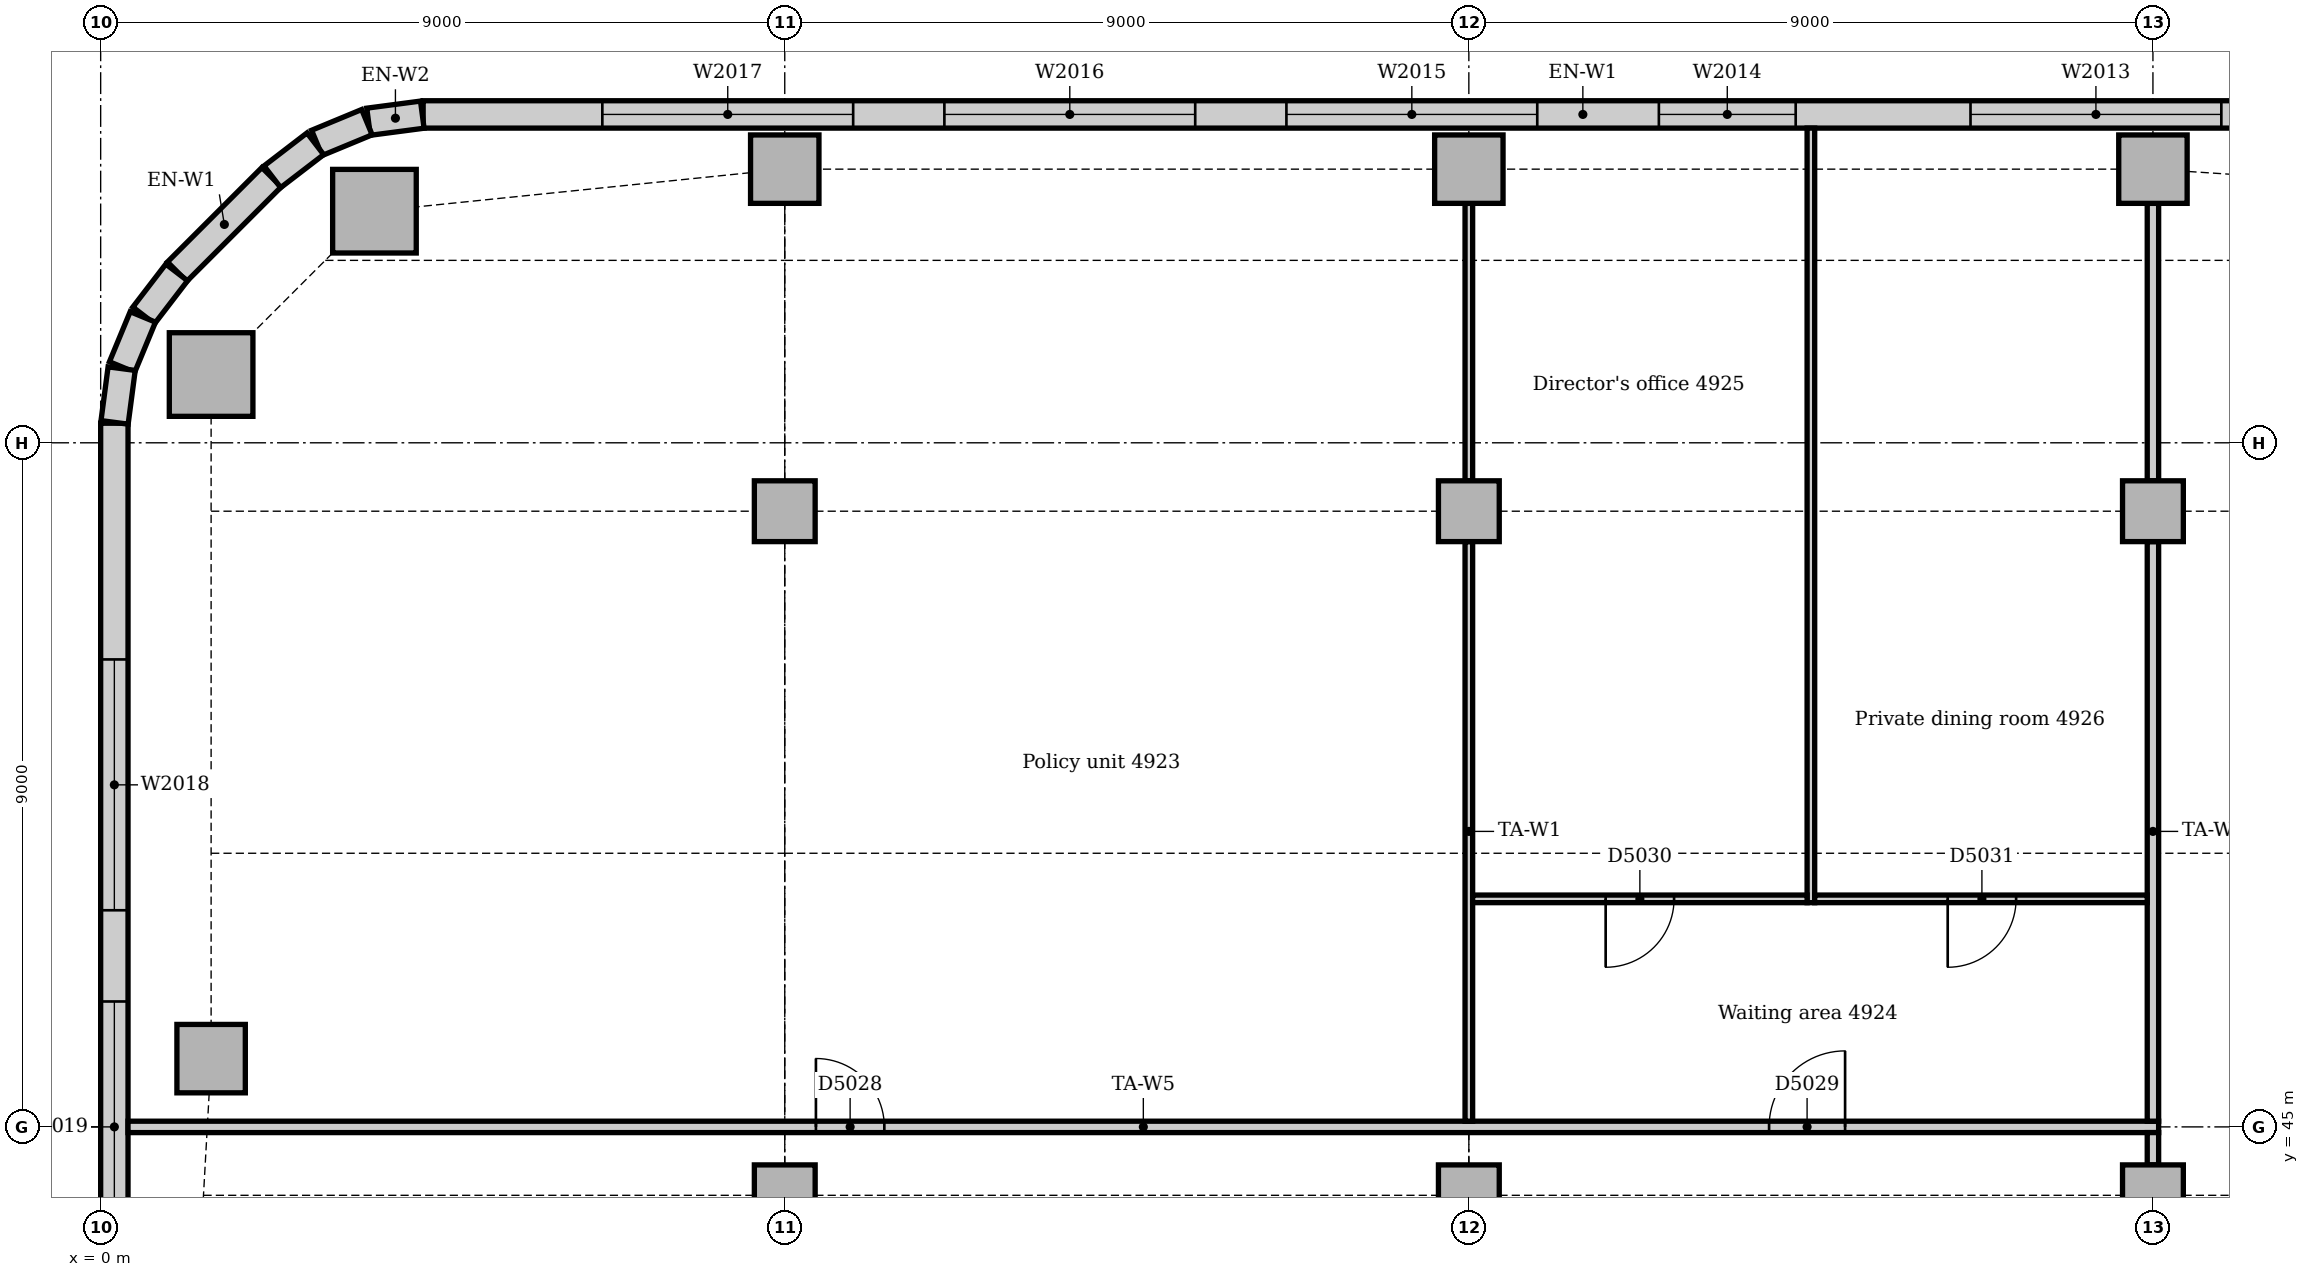
"""IFC4 building model, lengths in metres.
Left out: names, types, materials, properties, quantities, classifications, styles, units other than length and angle.
Written with IfcOpenShell. Run it as: python <this file> out.ifc"""

import sys

from ifc_helpers import new_model, si_unit, direction, frame, frame_2d, origin, origin_2d, place, context, subcontext, project, spatial, rectangle, extrude, element, fill, save


model = new_model("IFC4")
c1 = context("Model", 3, precision=1e-05, world=origin(), true_north=direction((0.0, 1.0)))
c2 = subcontext(c1, "Body", "Model", "MODEL_VIEW")
j1 = project(units=[si_unit("LENGTHUNIT", "METRE"), si_unit("PLANEANGLEUNIT", "RADIAN")], contexts=[c1])
p1 = place(None, origin())
s1 = spatial("IfcSite", under=j1, at=p1, CompositionType="ELEMENT")
p2 = place(p1, origin())
s2 = spatial("IfcBuilding", under=s1, at=p2, CompositionType="ELEMENT")
p3 = place(p2, frame((0.0, 0.0, 206.0)))
s3 = spatial("IfcBuildingStorey", under=s2, at=p3, CompositionType="ELEMENT", Elevation=206.0)
for number, where, z_axis, x_axis in (
    (1, (3.602, 57.047, 0.0), (0.0, 0.0, 1.0), (1.0, 0.0, 0.0)),
    (2, (1.453, 54.898, 0.0), (0.0, 0.0, 1.0), (1.0, 0.0, 0.0)),
):
    element("IfcColumn", number, at=place(p3, frame(where, z_axis=z_axis, x_axis=x_axis)), inside=s3, PredefinedType="COLUMN", context=c2, shape_type="SweptSolid", body=[
        extrude(rectangle(XDim=1.1, YDim=1.1, at=origin_2d()), origin(), (0.0, 0.0, 1.0), 3.85),
    ])
for number, where, z_axis, x_axis in (
    (3, (9.0, 57.6, 0.0), (0.0, 0.0, 1.0), (1.0, 0.0, 0.0)),
    (4, (18.0, 57.6, 0.0), (0.0, 0.0, 1.0), (1.0, 0.0, 0.0)),
    (5, (27.0, 57.6, 0.0), (0.0, 0.0, 1.0), (1.0, 0.0, 0.0)),
    (6, (1.453, 45.898, 0.0), (0.0, 0.0, 1.0), (1.0, 0.0, 0.0)),
):
    element("IfcColumn", number, at=place(p3, frame(where, z_axis=z_axis, x_axis=x_axis)), inside=s3, PredefinedType="COLUMN", context=c2, shape_type="SweptSolid", body=[
        extrude(rectangle(XDim=0.9, YDim=0.9, at=origin_2d()), origin(), (0.0, 0.0, 1.0), 3.85),
    ])
for number, where, z_axis, x_axis in (
    (7, (9.0, 44.1, 0.0), (0.0, 0.0, 1.0), (1.0, 0.0, 0.0)),
    (8, (9.0, 53.1, 0.0), (0.0, 0.0, 1.0), (1.0, 0.0, 0.0)),
    (9, (18.0, 44.1, 0.0), (0.0, 0.0, 1.0), (1.0, 0.0, 0.0)),
    (10, (18.0, 53.1, 0.0), (0.0, 0.0, 1.0), (1.0, 0.0, 0.0)),
    (11, (27.0, 44.1, 0.0), (0.0, 0.0, 1.0), (1.0, 0.0, 0.0)),
    (12, (27.0, 53.1, 0.0), (0.0, 0.0, 1.0), (1.0, 0.0, 0.0)),
):
    element("IfcColumn", number, at=place(p3, frame(where, z_axis=z_axis, x_axis=x_axis)), inside=s3, PredefinedType="COLUMN", context=c2, shape_type="SweptSolid", body=[
        extrude(rectangle(XDim=0.8, YDim=0.8, at=origin_2d()), origin(), (0.0, 0.0, 1.0), 3.85),
    ])
p4 = place(p3, frame((34.757, 58.32, 0.0), z_axis=(0.0, 0.0, 1.0), x_axis=(-1.0, 0.0, 0.0)))
e13 = element("IfcWall", 13, at=p4, inside=s3, PredefinedType="STANDARD", context=c2, shape_type="SweptSolid", body=[
    extrude(rectangle(XDim=30.515, YDim=0.36, at=frame_2d((15.257, 0.0))), origin(), (0.0, 0.0, 1.0), 3.85),
])
p5 = place(p4, frame((2.357, 0.0, 0.9)))
e14 = element("IfcOpeningElement", 14, at=p5, cuts=e13, PredefinedType="OPENING", context=c2, shape_type="SweptSolid", body=[
    extrude(rectangle(XDim=3.3, YDim=1.6, at=frame_2d((1.65, 0.8))), frame((0.0, 0.19, 0.0), z_axis=(0.0, -1.0, 0.0), x_axis=(1.0, 0.0, 0.0)), (0.0, 0.0, 1.0), 0.38),
])
p6 = place(p4, frame((6.857, 0.0, 0.9)))
e15 = element("IfcOpeningElement", 15, at=p6, cuts=e13, PredefinedType="OPENING", context=c2, shape_type="SweptSolid", body=[
    extrude(rectangle(XDim=3.3, YDim=1.6, at=frame_2d((1.65, 0.8))), frame((0.0, 0.19, 0.0), z_axis=(0.0, -1.0, 0.0), x_axis=(1.0, 0.0, 0.0)), (0.0, 0.0, 1.0), 0.38),
])
p7 = place(p4, frame((12.457, 0.0, 0.9)))
e16 = element("IfcOpeningElement", 16, at=p7, cuts=e13, PredefinedType="OPENING", context=c2, shape_type="SweptSolid", body=[
    extrude(rectangle(XDim=1.8, YDim=1.6, at=frame_2d((0.9, 0.8))), frame((0.0, 0.19, 0.0), z_axis=(0.0, -1.0, 0.0), x_axis=(1.0, 0.0, 0.0)), (0.0, 0.0, 1.0), 0.38),
])
p8 = place(p4, frame((15.857, 0.0, 0.9)))
e17 = element("IfcOpeningElement", 17, at=p8, cuts=e13, PredefinedType="OPENING", context=c2, shape_type="SweptSolid", body=[
    extrude(rectangle(XDim=3.3, YDim=1.6, at=frame_2d((1.65, 0.8))), frame((0.0, 0.19, 0.0), z_axis=(0.0, -1.0, 0.0), x_axis=(1.0, 0.0, 0.0)), (0.0, 0.0, 1.0), 0.38),
])
p9 = place(p4, frame((20.357, 0.0, 0.9)))
e18 = element("IfcOpeningElement", 18, at=p9, cuts=e13, PredefinedType="OPENING", context=c2, shape_type="SweptSolid", body=[
    extrude(rectangle(XDim=3.3, YDim=1.6, at=frame_2d((1.65, 0.8))), frame((0.0, 0.19, 0.0), z_axis=(0.0, -1.0, 0.0), x_axis=(1.0, 0.0, 0.0)), (0.0, 0.0, 1.0), 0.38),
])
p10 = place(p4, frame((24.857, 0.0, 0.9)))
e19 = element("IfcOpeningElement", 19, at=p10, cuts=e13, PredefinedType="OPENING", context=c2, shape_type="SweptSolid", body=[
    extrude(rectangle(XDim=3.3, YDim=1.6, at=frame_2d((1.65, 0.8))), frame((0.0, 0.19, 0.0), z_axis=(0.0, -1.0, 0.0), x_axis=(1.0, 0.0, 0.0)), (0.0, 0.0, 1.0), 0.38),
])
p11 = place(p3, frame((2.249, 57.494, 0.0), z_axis=(0.0, 0.0, 1.0), x_axis=(-0.707106781187, -0.707106781187, 0.0)))
e20 = element("IfcWall", 20, at=p11, inside=s3, PredefinedType="STANDARD", context=c2, shape_type="SweptSolid", body=[
    extrude(rectangle(XDim=1.757, YDim=0.36, at=frame_2d((0.879, 0.0))), origin(), (0.0, 0.0, 1.0), 3.85),
])
p12 = place(p3, frame((0.18, 54.257, 0.0), z_axis=(0.0, 0.0, 1.0), x_axis=(0.0, -1.0, 0.0)))
e21 = element("IfcWall", 21, at=p12, inside=s3, PredefinedType="STANDARD", context=c2, shape_type="SweptSolid", body=[
    extrude(rectangle(XDim=12.257, YDim=0.36, at=frame_2d((6.129, 0.0))), origin(), (0.0, 0.0, 1.0), 3.85),
])
p13 = place(p12, frame((3.107, 0.0, 0.9)))
e22 = element("IfcOpeningElement", 22, at=p13, cuts=e21, PredefinedType="OPENING", context=c2, shape_type="SweptSolid", body=[
    extrude(rectangle(XDim=3.3, YDim=1.6, at=frame_2d((1.65, 0.8))), frame((0.0, 0.19, 0.0), z_axis=(0.0, -1.0, 0.0), x_axis=(1.0, 0.0, 0.0)), (0.0, 0.0, 1.0), 0.38),
])
p14 = place(p12, frame((7.607, 0.0, 0.9)))
e23 = element("IfcOpeningElement", 23, at=p14, cuts=e21, PredefinedType="OPENING", context=c2, shape_type="SweptSolid", body=[
    extrude(rectangle(XDim=3.3, YDim=1.6, at=frame_2d((1.65, 0.8))), frame((0.0, 0.19, 0.0), z_axis=(0.0, -1.0, 0.0), x_axis=(1.0, 0.0, 0.0)), (0.0, 0.0, 1.0), 0.38),
])
for number, where, z_axis, x_axis in (
    (24, (4.231, 58.317, 0.0), (0.0, 0.0, 1.0), (-0.991, -0.131, 0.0)),
    (25, (3.503, 58.218, 0.0), (0.0, 0.0, 1.0), (-0.924, -0.383, 0.0)),
):
    element("IfcWall", number, at=place(p3, frame(where, z_axis=z_axis, x_axis=x_axis)), inside=s3, PredefinedType="STANDARD", context=c2, shape_type="SweptSolid", body=[
        extrude(rectangle(XDim=0.713, YDim=0.36, at=frame_2d((0.356, 0.0))), origin(), (0.0, 0.0, 1.0), 3.85),
    ])
for number, where, z_axis, x_axis in (
    (26, (2.825, 57.934, 0.0), (0.0, 0.0, 1.0), (-0.793, -0.609, 0.0)),
    (27, (1.0, 56.241, 0.0), (0.0, 0.0, 1.0), (-0.609, -0.793, 0.0)),
):
    element("IfcWall", number, at=place(p3, frame(where, z_axis=z_axis, x_axis=x_axis)), inside=s3, PredefinedType="STANDARD", context=c2, shape_type="SweptSolid", body=[
        extrude(rectangle(XDim=0.713, YDim=0.36, at=frame_2d((0.357, 0.0))), origin(), (0.0, 0.0, 1.0), 3.85),
    ])
for number, where, z_axis, x_axis in (
    (28, (0.555, 55.656, 0.0), (0.0, 0.0, 1.0), (-0.383, -0.924, 0.0)),
    (29, (0.276, 54.976, 0.0), (0.0, 0.0, 1.0), (-0.131, -0.991, 0.0)),
):
    element("IfcWall", number, at=place(p3, frame(where, z_axis=z_axis, x_axis=x_axis)), inside=s3, PredefinedType="STANDARD", context=c2, shape_type="SweptSolid", body=[
        extrude(rectangle(XDim=0.713, YDim=0.36, at=frame_2d((0.356, 0.0))), origin(), (0.0, 0.0, 1.0), 3.85),
    ])
p15 = place(p3, frame((0.36, 45.0, 0.0), z_axis=(0.0, 0.0, 1.0), x_axis=(1.0, 0.0, 0.0)))
e30 = element("IfcWall", 30, at=p15, inside=s3, PredefinedType="PARTITIONING", context=c2, shape_type="SweptSolid", body=[
    extrude(rectangle(XDim=26.715, YDim=0.15, at=frame_2d((13.357, 0.0))), origin(), (0.0, 0.0, 1.0), 3.85),
])
p16 = place(p15, frame((9.05, 0.0, 0.0)))
e31 = element("IfcOpeningElement", 31, at=p16, cuts=e30, PredefinedType="OPENING", context=c2, shape_type="SweptSolid", body=[
    extrude(rectangle(XDim=0.9, YDim=2.1, at=frame_2d((0.45, 1.05))), frame((0.0, 0.085, 0.0), z_axis=(0.0, -1.0, 0.0), x_axis=(1.0, 0.0, 0.0)), (0.0, 0.0, 1.0), 0.17),
])
p17 = place(p15, frame((21.59, 0.0, 0.0)))
e32 = element("IfcOpeningElement", 32, at=p17, cuts=e30, PredefinedType="OPENING", context=c2, shape_type="SweptSolid", body=[
    extrude(rectangle(XDim=1.0, YDim=2.1, at=frame_2d((0.5, 1.05))), frame((0.0, 0.085, 0.0), z_axis=(0.0, -1.0, 0.0), x_axis=(1.0, 0.0, 0.0)), (0.0, 0.0, 1.0), 0.17),
])
p18 = place(p3, frame((27.0, 44.5, 0.0), z_axis=(0.0, 0.0, 1.0), x_axis=(0.0, 1.0, 0.0)))
e33 = element("IfcWall", 33, at=p18, inside=s3, PredefinedType="PARTITIONING", context=c2, shape_type="SweptSolid", body=[
    extrude(rectangle(XDim=0.425, YDim=0.15, at=frame_2d((0.212, 0.0))), origin(), (0.0, 0.0, 1.0), 3.85),
])
p19 = place(p3, frame((27.0, 45.075, 0.0), z_axis=(0.0, 0.0, 1.0), x_axis=(0.0, 1.0, 0.0)))
e34 = element("IfcWall", 34, at=p19, inside=s3, PredefinedType="PARTITIONING", context=c2, shape_type="SweptSolid", body=[
    extrude(rectangle(XDim=7.625, YDim=0.15, at=frame_2d((3.812, 0.0))), origin(), (0.0, 0.0, 1.0), 3.35),
])
p20 = place(p3, frame((27.0, 53.5, 0.0), z_axis=(0.0, 0.0, 1.0), x_axis=(0.0, 1.0, 0.0)))
e35 = element("IfcWall", 35, at=p20, inside=s3, PredefinedType="PARTITIONING", context=c2, shape_type="SweptSolid", body=[
    extrude(rectangle(XDim=3.65, YDim=0.15, at=frame_2d((1.825, 0.0))), origin(), (0.0, 0.0, 1.0), 3.41),
])
p21 = place(p3, frame((18.0, 45.075, 0.0), z_axis=(0.0, 0.0, 1.0), x_axis=(0.0, 1.0, 0.0)))
e36 = element("IfcWall", 36, at=p21, inside=s3, PredefinedType="PARTITIONING", context=c2, shape_type="SweptSolid", body=[
    extrude(rectangle(XDim=7.625, YDim=0.1, at=frame_2d((3.812, 0.0))), origin(), (0.0, 0.0, 1.0), 3.35),
])
p22 = place(p3, frame((18.0, 53.5, 0.0), z_axis=(0.0, 0.0, 1.0), x_axis=(0.0, 1.0, 0.0)))
e37 = element("IfcWall", 37, at=p22, inside=s3, PredefinedType="PARTITIONING", context=c2, shape_type="SweptSolid", body=[
    extrude(rectangle(XDim=3.65, YDim=0.1, at=frame_2d((1.825, 0.0))), origin(), (0.0, 0.0, 1.0), 3.41),
])
p23 = place(p3, frame((22.5, 47.95, 0.0), z_axis=(0.0, 0.0, 1.0), x_axis=(0.0, 1.0, 0.0)))
e38 = element("IfcWall", 38, at=p23, inside=s3, PredefinedType="PARTITIONING", context=c2, shape_type="SweptSolid", body=[
    extrude(rectangle(XDim=10.19, YDim=0.1, at=frame_2d((5.095, 0.0))), origin(), (0.0, 0.0, 1.0), 3.85),
])
p24 = place(p3, frame((18.05, 48.0, 0.0), z_axis=(0.0, 0.0, 1.0), x_axis=(1.0, 0.0, 0.0)))
e39 = element("IfcWall", 39, at=p24, inside=s3, PredefinedType="PARTITIONING", context=c2, shape_type="SweptSolid", body=[
    extrude(rectangle(XDim=4.4, YDim=0.1, at=frame_2d((2.2, 0.0))), origin(), (0.0, 0.0, 1.0), 3.85),
])
p25 = place(p24, frame((1.75, 0.0, 0.0)))
e40 = element("IfcOpeningElement", 40, at=p25, cuts=e39, PredefinedType="OPENING", context=c2, shape_type="SweptSolid", body=[
    extrude(rectangle(XDim=0.9, YDim=2.1, at=frame_2d((0.45, 1.05))), frame((0.0, 0.06, 0.0), z_axis=(0.0, -1.0, 0.0), x_axis=(1.0, 0.0, 0.0)), (0.0, 0.0, 1.0), 0.12),
])
p26 = place(p3, frame((22.55, 48.0, 0.0), z_axis=(0.0, 0.0, 1.0), x_axis=(1.0, 0.0, 0.0)))
e41 = element("IfcWall", 41, at=p26, inside=s3, PredefinedType="PARTITIONING", context=c2, shape_type="SweptSolid", body=[
    extrude(rectangle(XDim=4.375, YDim=0.1, at=frame_2d((2.188, 0.0))), origin(), (0.0, 0.0, 1.0), 3.85),
])
p27 = place(p26, frame((1.75, 0.0, 0.0)))
e42 = element("IfcOpeningElement", 42, at=p27, cuts=e41, PredefinedType="OPENING", context=c2, shape_type="SweptSolid", body=[
    extrude(rectangle(XDim=0.9, YDim=2.1, at=frame_2d((0.45, 1.05))), frame((0.0, 0.06, 0.0), z_axis=(0.0, -1.0, 0.0), x_axis=(1.0, 0.0, 0.0)), (0.0, 0.0, 1.0), 0.12),
])
p28 = place(p6, origin())
e43 = element("IfcWindow", 43, at=p28, inside=s3, PartitioningType="SINGLE_PANEL", PredefinedType="WINDOW", context=c2, shape_type="SweptSolid", body=[
    extrude(rectangle(XDim=3.3, YDim=1.6, at=frame_2d((1.65, 0.8))), frame((0.0, 0.13, 0.0), z_axis=(0.0, -1.0, 0.0), x_axis=(1.0, 0.0, 0.0)), (0.0, 0.0, 1.0), 0.06),
])
fill(e15, e43)
p29 = place(p7, origin())
e44 = element("IfcWindow", 44, at=p29, inside=s3, PartitioningType="SINGLE_PANEL", PredefinedType="WINDOW", context=c2, shape_type="SweptSolid", body=[
    extrude(rectangle(XDim=1.8, YDim=1.6, at=frame_2d((0.9, 0.8))), frame((0.0, 0.13, 0.0), z_axis=(0.0, -1.0, 0.0), x_axis=(1.0, 0.0, 0.0)), (0.0, 0.0, 1.0), 0.06),
])
fill(e16, e44)
p30 = place(p8, origin())
e45 = element("IfcWindow", 45, at=p30, inside=s3, PartitioningType="SINGLE_PANEL", PredefinedType="WINDOW", context=c2, shape_type="SweptSolid", body=[
    extrude(rectangle(XDim=3.3, YDim=1.6, at=frame_2d((1.65, 0.8))), frame((0.0, 0.13, 0.0), z_axis=(0.0, -1.0, 0.0), x_axis=(1.0, 0.0, 0.0)), (0.0, 0.0, 1.0), 0.06),
])
fill(e17, e45)
p31 = place(p9, origin())
e46 = element("IfcWindow", 46, at=p31, inside=s3, PartitioningType="SINGLE_PANEL", PredefinedType="WINDOW", context=c2, shape_type="SweptSolid", body=[
    extrude(rectangle(XDim=3.3, YDim=1.6, at=frame_2d((1.65, 0.8))), frame((0.0, 0.13, 0.0), z_axis=(0.0, -1.0, 0.0), x_axis=(1.0, 0.0, 0.0)), (0.0, 0.0, 1.0), 0.06),
])
fill(e18, e46)
p32 = place(p10, origin())
e47 = element("IfcWindow", 47, at=p32, inside=s3, PartitioningType="SINGLE_PANEL", PredefinedType="WINDOW", context=c2, shape_type="SweptSolid", body=[
    extrude(rectangle(XDim=3.3, YDim=1.6, at=frame_2d((1.65, 0.8))), frame((0.0, 0.13, 0.0), z_axis=(0.0, -1.0, 0.0), x_axis=(1.0, 0.0, 0.0)), (0.0, 0.0, 1.0), 0.06),
])
fill(e19, e47)
p33 = place(p13, origin())
e48 = element("IfcWindow", 48, at=p33, inside=s3, PartitioningType="SINGLE_PANEL", PredefinedType="WINDOW", context=c2, shape_type="SweptSolid", body=[
    extrude(rectangle(XDim=3.3, YDim=1.6, at=frame_2d((1.65, 0.8))), frame((0.0, 0.13, 0.0), z_axis=(0.0, -1.0, 0.0), x_axis=(1.0, 0.0, 0.0)), (0.0, 0.0, 1.0), 0.06),
])
fill(e22, e48)
p34 = place(p14, origin())
e49 = element("IfcWindow", 49, at=p34, inside=s3, PartitioningType="SINGLE_PANEL", PredefinedType="WINDOW", context=c2, shape_type="SweptSolid", body=[
    extrude(rectangle(XDim=3.3, YDim=1.6, at=frame_2d((1.65, 0.8))), frame((0.0, 0.13, 0.0), z_axis=(0.0, -1.0, 0.0), x_axis=(1.0, 0.0, 0.0)), (0.0, 0.0, 1.0), 0.06),
])
fill(e23, e49)
p35 = place(p16, origin())
e50 = element("IfcDoor", 50, at=p35, inside=s3, OperationType="SINGLE_SWING_LEFT", PredefinedType="DOOR", context=c2, shape_type="SweptSolid", body=[
    extrude(rectangle(XDim=0.9, YDim=2.1, at=frame_2d((0.45, 1.05))), frame((0.0, 0.025, 0.0), z_axis=(0.0, -1.0, 0.0), x_axis=(1.0, 0.0, 0.0)), (0.0, 0.0, 1.0), 0.05),
])
fill(e31, e50)
p36 = place(p17, origin())
e51 = element("IfcDoor", 51, at=p36, inside=s3, OperationType="SINGLE_SWING_RIGHT", PredefinedType="DOOR", context=c2, shape_type="SweptSolid", body=[
    extrude(rectangle(XDim=1.0, YDim=2.1, at=frame_2d((0.5, 1.05))), frame((0.0, 0.025, 0.0), z_axis=(0.0, -1.0, 0.0), x_axis=(1.0, 0.0, 0.0)), (0.0, 0.0, 1.0), 0.05),
])
fill(e32, e51)
p37 = place(p25, frame((0.9, 0.0, 0.0), z_axis=(0.0, 0.0, 1.0), x_axis=(-1.0, 0.0, 0.0)))
e52 = element("IfcDoor", 52, at=p37, inside=s3, OperationType="SINGLE_SWING_RIGHT", PredefinedType="DOOR", context=c2, shape_type="SweptSolid", body=[
    extrude(rectangle(XDim=0.9, YDim=2.1, at=frame_2d((0.45, 1.05))), frame((0.0, 0.025, 0.0), z_axis=(0.0, -1.0, 0.0), x_axis=(1.0, 0.0, 0.0)), (0.0, 0.0, 1.0), 0.05),
])
fill(e40, e52)
p38 = place(p27, frame((0.9, 0.0, 0.0), z_axis=(0.0, 0.0, 1.0), x_axis=(-1.0, 0.0, 0.0)))
e53 = element("IfcDoor", 53, at=p38, inside=s3, OperationType="SINGLE_SWING_RIGHT", PredefinedType="DOOR", context=c2, shape_type="SweptSolid", body=[
    extrude(rectangle(XDim=0.9, YDim=2.1, at=frame_2d((0.45, 1.05))), frame((0.0, 0.025, 0.0), z_axis=(0.0, -1.0, 0.0), x_axis=(1.0, 0.0, 0.0)), (0.0, 0.0, 1.0), 0.05),
])
fill(e42, e53)
save(model, sys.argv[1])
